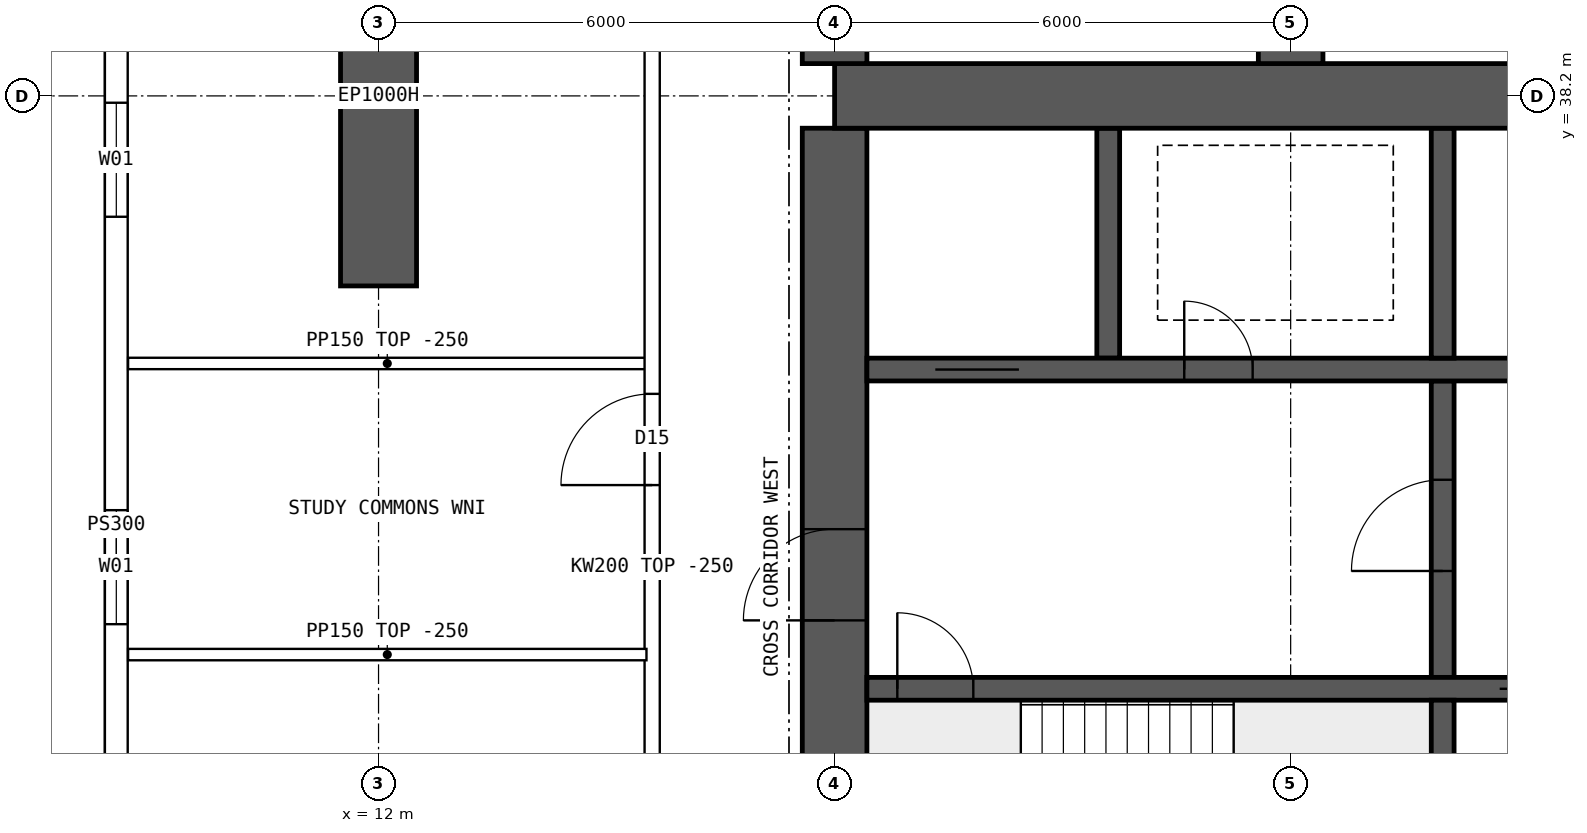
"""IFC4 building model, lengths in metres.
Left out: names, types, materials, properties, quantities, classifications, styles, units other than length and angle.
Written with IfcOpenShell. Run it as: python <this file> out.ifc"""

import sys

from ifc_helpers import new_model, si_unit, direction, frame, frame_2d, origin, place, context, subcontext, project, spatial, polyline, rectangle, outline, extrude, element, fill, save


model = new_model("IFC4")
c1 = context("Model", 3, precision=1e-05, world=origin(), true_north=direction((0.0, 1.0)))
c2 = subcontext(c1, "Body", "Model", "MODEL_VIEW")
j1 = project(units=[si_unit("LENGTHUNIT", "METRE"), si_unit("PLANEANGLEUNIT", "RADIAN")], contexts=[c1])
p1 = place(None, origin())
s1 = spatial("IfcSite", under=j1, at=p1, CompositionType="ELEMENT")
p2 = place(p1, origin())
s2 = spatial("IfcBuilding", under=s1, at=p2, CompositionType="ELEMENT")
p3 = place(p2, frame((0.0, 0.0, 186.1)))
s3 = spatial("IfcBuildingStorey", under=s2, at=p3, CompositionType="ELEMENT", Elevation=186.1)
p4 = place(p3, frame((12.0, 35.7, 0.0), z_axis=(0.0, 0.0, 1.0), x_axis=(0.0, 1.0, 0.0)))
e1 = element("IfcWall", 1, at=p4, inside=s3, PredefinedType="SHEAR", context=c2, shape_type="SweptSolid", body=[
    extrude(rectangle(XDim=5.0, YDim=1.0, at=frame_2d((2.5, 0.0))), origin(), (0.0, 0.0, 1.0), 3.75),
])
p5 = place(p3, frame((18.0, 38.2, 0.0), z_axis=(0.0, 0.0, 1.0), x_axis=(1.0, 0.0, 0.0)))
e2 = element("IfcWall", 2, at=p5, inside=s3, PredefinedType="SHEAR", context=c2, shape_type="SweptSolid", body=[
    extrude(rectangle(XDim=48.0, YDim=0.85, at=frame_2d((24.0, 0.0))), origin(), (0.0, 0.0, 1.0), 3.75),
])
p6 = place(p3, frame((18.0, 26.225, 0.0), z_axis=(0.0, 0.0, 1.0), x_axis=(0.0, 1.0, 0.0)))
e3 = element("IfcWall", 3, at=p6, inside=s3, PredefinedType="SHEAR", context=c2, shape_type="SweptSolid", body=[
    extrude(rectangle(XDim=11.55, YDim=0.85, at=frame_2d((5.775, 0.0))), origin(), (0.0, 0.0, 1.0), 3.75),
])
p7 = place(p6, frame((5.075, 0.0, 0.0)))
e4 = element("IfcOpeningElement", 4, at=p7, cuts=e3, PredefinedType="OPENING", context=c2, shape_type="SweptSolid", body=[
    extrude(rectangle(XDim=1.2, YDim=2.1, at=frame_2d((0.6, 1.05))), frame((0.0, 0.435, 0.0), z_axis=(0.0, -1.0, 0.0), x_axis=(1.0, 0.0, 0.0)), (0.0, 0.0, 1.0), 0.87),
])
p8 = place(p3, frame((18.425, 30.4, 0.0), z_axis=(0.0, 0.0, 1.0), x_axis=(1.0, 0.0, 0.0)))
e5 = element("IfcWall", 5, at=p8, inside=s3, PredefinedType="SHEAR", context=c2, shape_type="SweptSolid", body=[
    extrude(rectangle(XDim=47.15, YDim=0.3, at=frame_2d((23.575, 0.0))), origin(), (0.0, 0.0, 1.0), 3.75),
])
p9 = place(p8, frame((0.4, 0.0, 0.0)))
e6 = element("IfcOpeningElement", 6, at=p9, cuts=e5, PredefinedType="OPENING", context=c2, shape_type="SweptSolid", body=[
    extrude(rectangle(XDim=1.0, YDim=2.1, at=frame_2d((0.5, 1.05))), frame((0.0, 0.16, 0.0), z_axis=(0.0, -1.0, 0.0), x_axis=(1.0, 0.0, 0.0)), (0.0, 0.0, 1.0), 0.32),
])
p10 = place(p8, frame((45.75, 0.0, 0.0)))
e7 = element("IfcOpeningElement", 7, at=p10, cuts=e5, PredefinedType="OPENING", context=c2, shape_type="SweptSolid", body=[
    extrude(rectangle(XDim=1.0, YDim=2.1, at=frame_2d((0.5, 1.05))), frame((0.0, 0.16, 0.0), z_axis=(0.0, -1.0, 0.0), x_axis=(1.0, 0.0, 0.0)), (0.0, 0.0, 1.0), 0.32),
])
p11 = place(p8, frame((8.325, 0.0, 0.0)))
e8 = element("IfcOpeningElement", 8, at=p11, cuts=e5, PredefinedType="OPENING", context=c2, shape_type="SweptSolid", body=[
    extrude(rectangle(XDim=1.1, YDim=2.1, at=frame_2d((0.55, 1.05))), frame((0.0, 0.16, 0.0), z_axis=(0.0, -1.0, 0.0), x_axis=(1.0, 0.0, 0.0)), (0.0, 0.0, 1.0), 0.32),
])
p12 = place(p8, frame((10.925, 0.0, 0.0)))
e9 = element("IfcOpeningElement", 9, at=p12, cuts=e5, PredefinedType="OPENING", context=c2, shape_type="SweptSolid", body=[
    extrude(rectangle(XDim=1.1, YDim=2.1, at=frame_2d((0.55, 1.05))), frame((0.0, 0.16, 0.0), z_axis=(0.0, -1.0, 0.0), x_axis=(1.0, 0.0, 0.0)), (0.0, 0.0, 1.0), 0.32),
])
p13 = place(p8, frame((13.525, 0.0, 0.0)))
e10 = element("IfcOpeningElement", 10, at=p13, cuts=e5, PredefinedType="OPENING", context=c2, shape_type="SweptSolid", body=[
    extrude(rectangle(XDim=1.1, YDim=2.1, at=frame_2d((0.55, 1.05))), frame((0.0, 0.16, 0.0), z_axis=(0.0, -1.0, 0.0), x_axis=(1.0, 0.0, 0.0)), (0.0, 0.0, 1.0), 0.32),
])
p14 = place(p8, frame((16.125, 0.0, 0.0)))
e11 = element("IfcOpeningElement", 11, at=p14, cuts=e5, PredefinedType="OPENING", context=c2, shape_type="SweptSolid", body=[
    extrude(rectangle(XDim=1.1, YDim=2.1, at=frame_2d((0.55, 1.05))), frame((0.0, 0.16, 0.0), z_axis=(0.0, -1.0, 0.0), x_axis=(1.0, 0.0, 0.0)), (0.0, 0.0, 1.0), 0.32),
])
p15 = place(p8, frame((18.9, 0.0, 0.0)))
e12 = element("IfcOpeningElement", 12, at=p15, cuts=e5, PredefinedType="OPENING", context=c2, shape_type="SweptSolid", body=[
    extrude(rectangle(XDim=0.9, YDim=2.1, at=frame_2d((0.45, 1.05))), frame((0.0, 0.16, 0.0), z_axis=(0.0, -1.0, 0.0), x_axis=(1.0, 0.0, 0.0)), (0.0, 0.0, 1.0), 0.32),
])
p16 = place(p8, frame((30.192, 0.0, 0.0)))
e13 = element("IfcOpeningElement", 13, at=p16, cuts=e5, PredefinedType="OPENING", context=c2, shape_type="SweptSolid", body=[
    extrude(rectangle(XDim=1.1, YDim=2.1, at=frame_2d((0.55, 1.05))), frame((0.0, 0.16, 0.0), z_axis=(0.0, -1.0, 0.0), x_axis=(1.0, 0.0, 0.0)), (0.0, 0.0, 1.0), 0.32),
])
p17 = place(p8, frame((33.725, 0.0, 0.0)))
e14 = element("IfcOpeningElement", 14, at=p17, cuts=e5, PredefinedType="OPENING", context=c2, shape_type="SweptSolid", body=[
    extrude(rectangle(XDim=1.1, YDim=2.1, at=frame_2d((0.55, 1.05))), frame((0.0, 0.16, 0.0), z_axis=(0.0, -1.0, 0.0), x_axis=(1.0, 0.0, 0.0)), (0.0, 0.0, 1.0), 0.32),
])
p18 = place(p8, frame((37.258, 0.0, 0.0)))
e15 = element("IfcOpeningElement", 15, at=p18, cuts=e5, PredefinedType="OPENING", context=c2, shape_type="SweptSolid", body=[
    extrude(rectangle(XDim=1.1, YDim=2.1, at=frame_2d((0.55, 1.05))), frame((0.0, 0.16, 0.0), z_axis=(0.0, -1.0, 0.0), x_axis=(1.0, 0.0, 0.0)), (0.0, 0.0, 1.0), 0.32),
])
p19 = place(p3, frame((18.425, 34.6, 0.0), z_axis=(0.0, 0.0, 1.0), x_axis=(1.0, 0.0, 0.0)))
e16 = element("IfcWall", 16, at=p19, inside=s3, PredefinedType="SHEAR", context=c2, shape_type="SweptSolid", body=[
    extrude(rectangle(XDim=47.15, YDim=0.3, at=frame_2d((23.575, 0.0))), origin(), (0.0, 0.0, 1.0), 3.75),
])
p20 = place(p19, frame((0.9, 0.0, 0.0)))
e17 = element("IfcOpeningElement", 17, at=p20, cuts=e16, PredefinedType="OPENING", context=c2, shape_type="SweptSolid", body=[
    extrude(rectangle(XDim=1.1, YDim=2.1, at=frame_2d((0.55, 1.05))), frame((0.0, 0.16, 0.0), z_axis=(0.0, -1.0, 0.0), x_axis=(1.0, 0.0, 0.0)), (0.0, 0.0, 1.0), 0.32),
])
p21 = place(p19, frame((45.15, 0.0, 0.0)))
e18 = element("IfcOpeningElement", 18, at=p21, cuts=e16, PredefinedType="OPENING", context=c2, shape_type="SweptSolid", body=[
    extrude(rectangle(XDim=1.1, YDim=2.1, at=frame_2d((0.55, 1.05))), frame((0.0, 0.16, 0.0), z_axis=(0.0, -1.0, 0.0), x_axis=(1.0, 0.0, 0.0)), (0.0, 0.0, 1.0), 0.32),
])
p22 = place(p19, frame((4.175, 0.0, 0.0)))
e19 = element("IfcOpeningElement", 19, at=p22, cuts=e16, PredefinedType="OPENING", context=c2, shape_type="SweptSolid", body=[
    extrude(rectangle(XDim=0.9, YDim=2.1, at=frame_2d((0.45, 1.05))), frame((0.0, 0.16, 0.0), z_axis=(0.0, -1.0, 0.0), x_axis=(1.0, 0.0, 0.0)), (0.0, 0.0, 1.0), 0.32),
])
p23 = place(p19, frame((42.075, 0.0, 0.0)))
e20 = element("IfcOpeningElement", 20, at=p23, cuts=e16, PredefinedType="OPENING", context=c2, shape_type="SweptSolid", body=[
    extrude(rectangle(XDim=0.9, YDim=2.1, at=frame_2d((0.45, 1.05))), frame((0.0, 0.16, 0.0), z_axis=(0.0, -1.0, 0.0), x_axis=(1.0, 0.0, 0.0)), (0.0, 0.0, 1.0), 0.32),
])
p24 = place(p19, frame((8.95, 0.0, 0.0)))
e21 = element("IfcOpeningElement", 21, at=p24, cuts=e16, PredefinedType="OPENING", context=c2, shape_type="SweptSolid", body=[
    extrude(rectangle(XDim=0.9, YDim=2.1, at=frame_2d((0.45, 1.05))), frame((0.0, 0.16, 0.0), z_axis=(0.0, -1.0, 0.0), x_axis=(1.0, 0.0, 0.0)), (0.0, 0.0, 1.0), 0.32),
])
p25 = place(p19, frame((12.924, 0.0, 0.0)))
e22 = element("IfcOpeningElement", 22, at=p25, cuts=e16, PredefinedType="OPENING", context=c2, shape_type="SweptSolid", body=[
    extrude(rectangle(XDim=0.9, YDim=2.1, at=frame_2d((0.45, 1.05))), frame((0.0, 0.16, 0.0), z_axis=(0.0, -1.0, 0.0), x_axis=(1.0, 0.0, 0.0)), (0.0, 0.0, 1.0), 0.32),
])
p26 = place(p19, frame((16.571, 0.0, 0.0)))
e23 = element("IfcOpeningElement", 23, at=p26, cuts=e16, PredefinedType="OPENING", context=c2, shape_type="SweptSolid", body=[
    extrude(rectangle(XDim=0.9, YDim=2.1, at=frame_2d((0.45, 1.05))), frame((0.0, 0.16, 0.0), z_axis=(0.0, -1.0, 0.0), x_axis=(1.0, 0.0, 0.0)), (0.0, 0.0, 1.0), 0.32),
])
p27 = place(p19, frame((20.33, 0.0, 0.0)))
e24 = element("IfcOpeningElement", 24, at=p27, cuts=e16, PredefinedType="OPENING", context=c2, shape_type="SweptSolid", body=[
    extrude(rectangle(XDim=0.9, YDim=2.1, at=frame_2d((0.45, 1.05))), frame((0.0, 0.16, 0.0), z_axis=(0.0, -1.0, 0.0), x_axis=(1.0, 0.0, 0.0)), (0.0, 0.0, 1.0), 0.32),
])
p28 = place(p19, frame((24.736, 0.0, 0.0)))
e25 = element("IfcOpeningElement", 25, at=p28, cuts=e16, PredefinedType="OPENING", context=c2, shape_type="SweptSolid", body=[
    extrude(rectangle(XDim=0.9, YDim=2.1, at=frame_2d((0.45, 1.05))), frame((0.0, 0.16, 0.0), z_axis=(0.0, -1.0, 0.0), x_axis=(1.0, 0.0, 0.0)), (0.0, 0.0, 1.0), 0.32),
])
p29 = place(p19, frame((27.533, 0.0, 0.0)))
e26 = element("IfcOpeningElement", 26, at=p29, cuts=e16, PredefinedType="OPENING", context=c2, shape_type="SweptSolid", body=[
    extrude(rectangle(XDim=0.9, YDim=2.1, at=frame_2d((0.45, 1.05))), frame((0.0, 0.16, 0.0), z_axis=(0.0, -1.0, 0.0), x_axis=(1.0, 0.0, 0.0)), (0.0, 0.0, 1.0), 0.32),
])
p30 = place(p19, frame((30.716, 0.0, 0.0)))
e27 = element("IfcOpeningElement", 27, at=p30, cuts=e16, PredefinedType="OPENING", context=c2, shape_type="SweptSolid", body=[
    extrude(rectangle(XDim=0.9, YDim=2.1, at=frame_2d((0.45, 1.05))), frame((0.0, 0.16, 0.0), z_axis=(0.0, -1.0, 0.0), x_axis=(1.0, 0.0, 0.0)), (0.0, 0.0, 1.0), 0.32),
])
p31 = place(p19, frame((34.667, 0.0, 0.0)))
e28 = element("IfcOpeningElement", 28, at=p31, cuts=e16, PredefinedType="OPENING", context=c2, shape_type="SweptSolid", body=[
    extrude(rectangle(XDim=0.9, YDim=2.1, at=frame_2d((0.45, 1.05))), frame((0.0, 0.16, 0.0), z_axis=(0.0, -1.0, 0.0), x_axis=(1.0, 0.0, 0.0)), (0.0, 0.0, 1.0), 0.32),
])
p32 = place(p19, frame((37.605, 0.0, 0.0)))
e29 = element("IfcOpeningElement", 29, at=p32, cuts=e16, PredefinedType="OPENING", context=c2, shape_type="SweptSolid", body=[
    extrude(rectangle(XDim=0.9, YDim=2.1, at=frame_2d((0.45, 1.05))), frame((0.0, 0.16, 0.0), z_axis=(0.0, -1.0, 0.0), x_axis=(1.0, 0.0, 0.0)), (0.0, 0.0, 1.0), 0.32),
])
p33 = place(p3, frame((26.0, 26.225, 0.0), z_axis=(0.0, 0.0, 1.0), x_axis=(0.0, 1.0, 0.0)))
e30 = element("IfcWall", 30, at=p33, inside=s3, PredefinedType="SHEAR", context=c2, shape_type="SweptSolid", body=[
    extrude(rectangle(XDim=4.025, YDim=0.3, at=frame_2d((2.012, 0.0))), origin(), (0.0, 0.0, 1.0), 3.75),
])
p34 = place(p3, frame((26.0, 30.55, 0.0), z_axis=(0.0, 0.0, 1.0), x_axis=(0.0, 1.0, 0.0)))
e31 = element("IfcWall", 31, at=p34, inside=s3, PredefinedType="SHEAR", context=c2, shape_type="SweptSolid", body=[
    extrude(rectangle(XDim=3.9, YDim=0.3, at=frame_2d((1.95, 0.0))), origin(), (0.0, 0.0, 1.0), 3.75),
])
p35 = place(p34, frame((1.4, 0.0, 0.0)))
e32 = element("IfcOpeningElement", 32, at=p35, cuts=e31, PredefinedType="OPENING", context=c2, shape_type="SweptSolid", body=[
    extrude(rectangle(XDim=1.2, YDim=2.1, at=frame_2d((0.6, 1.05))), frame((0.0, 0.16, 0.0), z_axis=(0.0, -1.0, 0.0), x_axis=(1.0, 0.0, 0.0)), (0.0, 0.0, 1.0), 0.32),
])
for number, where, z_axis, x_axis in (
    (33, (21.6, 34.75, 0.0), (0.0, 0.0, 1.0), (0.0, 1.0, 0.0)),
    (34, (26.0, 34.75, 0.0), (0.0, 0.0, 1.0), (0.0, 1.0, 0.0)),
):
    element("IfcWall", number, at=place(p3, frame(where, z_axis=z_axis, x_axis=x_axis)), inside=s3, PredefinedType="SHEAR", context=c2, shape_type="SweptSolid", body=[
        extrude(rectangle(XDim=3.025, YDim=0.3, at=frame_2d((1.512, 0.0))), origin(), (0.0, 0.0, 1.0), 3.75),
    ])
for number, where, z_axis, x_axis in (
    (35, (18.0, 38.625, 0.0), (0.0, 0.0, 1.0), (0.0, 1.0, 0.0)),
    (36, (24.0, 38.625, 0.0), (0.0, 0.0, 1.0), (0.0, 1.0, 0.0)),
):
    element("IfcWall", number, at=place(p3, frame(where, z_axis=z_axis, x_axis=x_axis)), inside=s3, PredefinedType="SHEAR", context=c2, shape_type="SweptSolid", body=[
        extrude(rectangle(XDim=8.175, YDim=0.85, at=frame_2d((4.087, 0.0))), origin(), (0.0, 0.0, 1.0), 3.75),
    ])
p36 = place(p3, frame((8.55, 45.4, 0.0), z_axis=(0.0, 0.0, 1.0), x_axis=(0.0, -1.0, 0.0)))
e37 = element("IfcWall", 37, at=p36, inside=s3, PredefinedType="SOLIDWALL", context=c2, shape_type="SweptSolid", body=[
    extrude(outline(polyline([(-0.015, -0.15), (26.815, -0.15), (26.785, 0.15), (0.015, 0.15), (-0.015, -0.15)])), origin(), (0.0, 0.0, 1.0), 3.5),
])
p37 = place(p36, frame((1.93, 0.0, 0.9)))
e38 = element("IfcOpeningElement", 38, at=p37, cuts=e37, PredefinedType="OPENING", context=c2, shape_type="SweptSolid", body=[
    extrude(rectangle(XDim=1.5, YDim=2.0, at=frame_2d((0.75, 1.0))), frame((0.0, 0.16, 0.0), z_axis=(0.0, -1.0, 0.0), x_axis=(1.0, 0.0, 0.0)), (0.0, 0.0, 1.0), 0.32),
])
p38 = place(p36, frame((7.29, 0.0, 0.9)))
e39 = element("IfcOpeningElement", 39, at=p38, cuts=e37, PredefinedType="OPENING", context=c2, shape_type="SweptSolid", body=[
    extrude(rectangle(XDim=1.5, YDim=2.0, at=frame_2d((0.75, 1.0))), frame((0.0, 0.16, 0.0), z_axis=(0.0, -1.0, 0.0), x_axis=(1.0, 0.0, 0.0)), (0.0, 0.0, 1.0), 0.32),
])
p39 = place(p36, frame((12.65, 0.0, 0.9)))
e40 = element("IfcOpeningElement", 40, at=p39, cuts=e37, PredefinedType="OPENING", context=c2, shape_type="SweptSolid", body=[
    extrude(rectangle(XDim=1.5, YDim=2.0, at=frame_2d((0.75, 1.0))), frame((0.0, 0.16, 0.0), z_axis=(0.0, -1.0, 0.0), x_axis=(1.0, 0.0, 0.0)), (0.0, 0.0, 1.0), 0.32),
])
p40 = place(p36, frame((18.01, 0.0, 0.9)))
e41 = element("IfcOpeningElement", 41, at=p40, cuts=e37, PredefinedType="OPENING", context=c2, shape_type="SweptSolid", body=[
    extrude(rectangle(XDim=1.5, YDim=2.0, at=frame_2d((0.75, 1.0))), frame((0.0, 0.16, 0.0), z_axis=(0.0, -1.0, 0.0), x_axis=(1.0, 0.0, 0.0)), (0.0, 0.0, 1.0), 0.32),
])
p41 = place(p36, frame((23.37, 0.0, 0.9)))
e42 = element("IfcOpeningElement", 42, at=p41, cuts=e37, PredefinedType="OPENING", context=c2, shape_type="SweptSolid", body=[
    extrude(rectangle(XDim=1.5, YDim=2.0, at=frame_2d((0.75, 1.0))), frame((0.0, 0.16, 0.0), z_axis=(0.0, -1.0, 0.0), x_axis=(1.0, 0.0, 0.0)), (0.0, 0.0, 1.0), 0.32),
])
p42 = place(p3, frame((8.705, 30.85, 0.0), z_axis=(0.0, 0.0, 1.0), x_axis=(1.0, 0.0, 0.0)))
e43 = element("IfcWall", 43, at=p42, inside=s3, PredefinedType="PARTITIONING", context=c2, shape_type="SweptSolid", body=[
    extrude(outline(polyline([(0.0, 0.0), (6.82, 0.0), (6.82, 3.5), (3.597, 3.5), (3.595, 3.05), (2.997, 3.05), (2.995, 3.5), (0.0, 3.5), (0.0, 0.0)])), frame((0.0, 0.075, 0.0), z_axis=(0.0, -1.0, 0.0), x_axis=(1.0, 0.0, 0.0)), (0.0, 0.0, 1.0), 0.15),
])
p43 = place(p3, frame((15.6, 10.446, 0.0), z_axis=(0.0, 0.0, 1.0), x_axis=(0.0, 1.0, 0.0)))
e44 = element("IfcWall", 44, at=p43, inside=s3, PredefinedType="SOLIDWALL", context=c2, shape_type="SweptSolid", body=[
    extrude(rectangle(XDim=43.107, YDim=0.2, at=frame_2d((21.554, 0.0))), origin(), (0.0, 0.0, 1.0), 3.5),
])
p44 = place(p43, frame((22.634, 0.0, 0.0)))
e45 = element("IfcOpeningElement", 45, at=p44, cuts=e44, PredefinedType="OPENING", context=c2, shape_type="SweptSolid", body=[
    extrude(rectangle(XDim=1.2, YDim=2.1, at=frame_2d((0.6, 1.05))), frame((0.0, 0.11, 0.0), z_axis=(0.0, -1.0, 0.0), x_axis=(1.0, 0.0, 0.0)), (0.0, 0.0, 1.0), 0.22),
])
p45 = place(p43, frame((5.104, 0.0, 0.0)))
e46 = element("IfcOpeningElement", 46, at=p45, cuts=e44, PredefinedType="OPENING", context=c2, shape_type="SweptSolid", body=[
    extrude(rectangle(XDim=1.4, YDim=2.1, at=frame_2d((0.7, 1.05))), frame((0.0, 0.11, 0.0), z_axis=(0.0, -1.0, 0.0), x_axis=(1.0, 0.0, 0.0)), (0.0, 0.0, 1.0), 0.22),
])
p46 = place(p43, frame((36.504, 0.0, 0.0)))
e47 = element("IfcOpeningElement", 47, at=p46, cuts=e44, PredefinedType="OPENING", context=c2, shape_type="SweptSolid", body=[
    extrude(rectangle(XDim=1.4, YDim=2.1, at=frame_2d((0.7, 1.05))), frame((0.0, 0.11, 0.0), z_axis=(0.0, -1.0, 0.0), x_axis=(1.0, 0.0, 0.0)), (0.0, 0.0, 1.0), 0.22),
])
p47 = place(p3, frame((8.705, 34.68, 0.0), z_axis=(0.0, 0.0, 1.0), x_axis=(1.0, 0.0, 0.0)))
e48 = element("IfcWall", 48, at=p47, inside=s3, PredefinedType="PARTITIONING", context=c2, shape_type="SweptSolid", body=[
    extrude(outline(polyline([(0.0, 0.0), (6.82, 0.0), (6.82, 3.5), (3.597, 3.5), (3.595, 3.05), (2.997, 3.05), (2.995, 3.5), (0.0, 3.5), (0.0, 0.0)])), frame((0.0, 0.075, 0.0), z_axis=(0.0, -1.0, 0.0), x_axis=(1.0, 0.0, 0.0)), (0.0, 0.0, 1.0), 0.15),
])
p48 = place(p38, origin())
e49 = element("IfcWindow", 49, at=p48, inside=s3, PartitioningType="SINGLE_PANEL", PredefinedType="WINDOW", context=c2, shape_type="SweptSolid", body=[
    extrude(rectangle(XDim=1.5, YDim=2.0, at=frame_2d((0.75, 1.0))), frame((0.0, 0.03, 0.0), z_axis=(0.0, -1.0, 0.0), x_axis=(1.0, 0.0, 0.0)), (0.0, 0.0, 1.0), 0.06),
])
fill(e39, e49)
p49 = place(p39, origin())
e50 = element("IfcWindow", 50, at=p49, inside=s3, PartitioningType="SINGLE_PANEL", PredefinedType="WINDOW", context=c2, shape_type="SweptSolid", body=[
    extrude(rectangle(XDim=1.5, YDim=2.0, at=frame_2d((0.75, 1.0))), frame((0.0, 0.03, 0.0), z_axis=(0.0, -1.0, 0.0), x_axis=(1.0, 0.0, 0.0)), (0.0, 0.0, 1.0), 0.06),
])
fill(e40, e50)
p50 = place(p7, origin())
e51 = element("IfcDoor", 51, at=p50, inside=s3, OperationType="SINGLE_SWING_LEFT", PredefinedType="DOOR", context=c2, shape_type="SweptSolid", body=[
    extrude(rectangle(XDim=1.2, YDim=2.1, at=frame_2d((0.6, 1.05))), frame((0.0, 0.025, 0.0), z_axis=(0.0, -1.0, 0.0), x_axis=(1.0, 0.0, 0.0)), (0.0, 0.0, 1.0), 0.05),
])
fill(e4, e51)
p51 = place(p9, origin())
e52 = element("IfcDoor", 52, at=p51, inside=s3, OperationType="SINGLE_SWING_LEFT", PredefinedType="DOOR", context=c2, shape_type="SweptSolid", body=[
    extrude(rectangle(XDim=1.0, YDim=2.1, at=frame_2d((0.5, 1.05))), frame((0.0, 0.025, 0.0), z_axis=(0.0, -1.0, 0.0), x_axis=(1.0, 0.0, 0.0)), (0.0, 0.0, 1.0), 0.05),
])
fill(e6, e52)
p52 = place(p20, origin())
e53 = element("IfcDoor", 53, at=p52, inside=s3, OperationType="DOUBLE_DOOR_SLIDING", PredefinedType="DOOR", context=c2, shape_type="SweptSolid", body=[
    extrude(rectangle(XDim=1.1, YDim=2.1, at=frame_2d((0.55, 1.05))), frame((0.0, 0.025, 0.0), z_axis=(0.0, -1.0, 0.0), x_axis=(1.0, 0.0, 0.0)), (0.0, 0.0, 1.0), 0.05),
])
fill(e17, e53)
p53 = place(p22, origin())
e54 = element("IfcDoor", 54, at=p53, inside=s3, OperationType="SINGLE_SWING_LEFT", PredefinedType="DOOR", context=c2, shape_type="SweptSolid", body=[
    extrude(rectangle(XDim=0.9, YDim=2.1, at=frame_2d((0.45, 1.05))), frame((0.0, 0.025, 0.0), z_axis=(0.0, -1.0, 0.0), x_axis=(1.0, 0.0, 0.0)), (0.0, 0.0, 1.0), 0.05),
])
fill(e19, e54)
p54 = place(p35, origin())
e55 = element("IfcDoor", 55, at=p54, inside=s3, OperationType="SINGLE_SWING_LEFT", PredefinedType="DOOR", context=c2, shape_type="SweptSolid", body=[
    extrude(rectangle(XDim=1.2, YDim=2.1, at=frame_2d((0.6, 1.05))), frame((0.0, 0.025, 0.0), z_axis=(0.0, -1.0, 0.0), x_axis=(1.0, 0.0, 0.0)), (0.0, 0.0, 1.0), 0.05),
])
fill(e32, e55)
p55 = place(p11, origin())
e56 = element("IfcDoor", 56, at=p55, inside=s3, OperationType="DOUBLE_DOOR_SLIDING", PredefinedType="DOOR", context=c2, shape_type="SweptSolid", body=[
    extrude(rectangle(XDim=1.1, YDim=2.1, at=frame_2d((0.55, 1.05))), frame((0.0, 0.025, 0.0), z_axis=(0.0, -1.0, 0.0), x_axis=(1.0, 0.0, 0.0)), (0.0, 0.0, 1.0), 0.05),
])
fill(e8, e56)
p56 = place(p44, origin())
e57 = element("IfcDoor", 57, at=p56, inside=s3, OperationType="SINGLE_SWING_LEFT", PredefinedType="DOOR", context=c2, shape_type="SweptSolid", body=[
    extrude(rectangle(XDim=1.2, YDim=2.1, at=frame_2d((0.6, 1.05))), frame((0.0, 0.025, 0.0), z_axis=(0.0, -1.0, 0.0), x_axis=(1.0, 0.0, 0.0)), (0.0, 0.0, 1.0), 0.05),
])
fill(e45, e57)
save(model, sys.argv[1])
